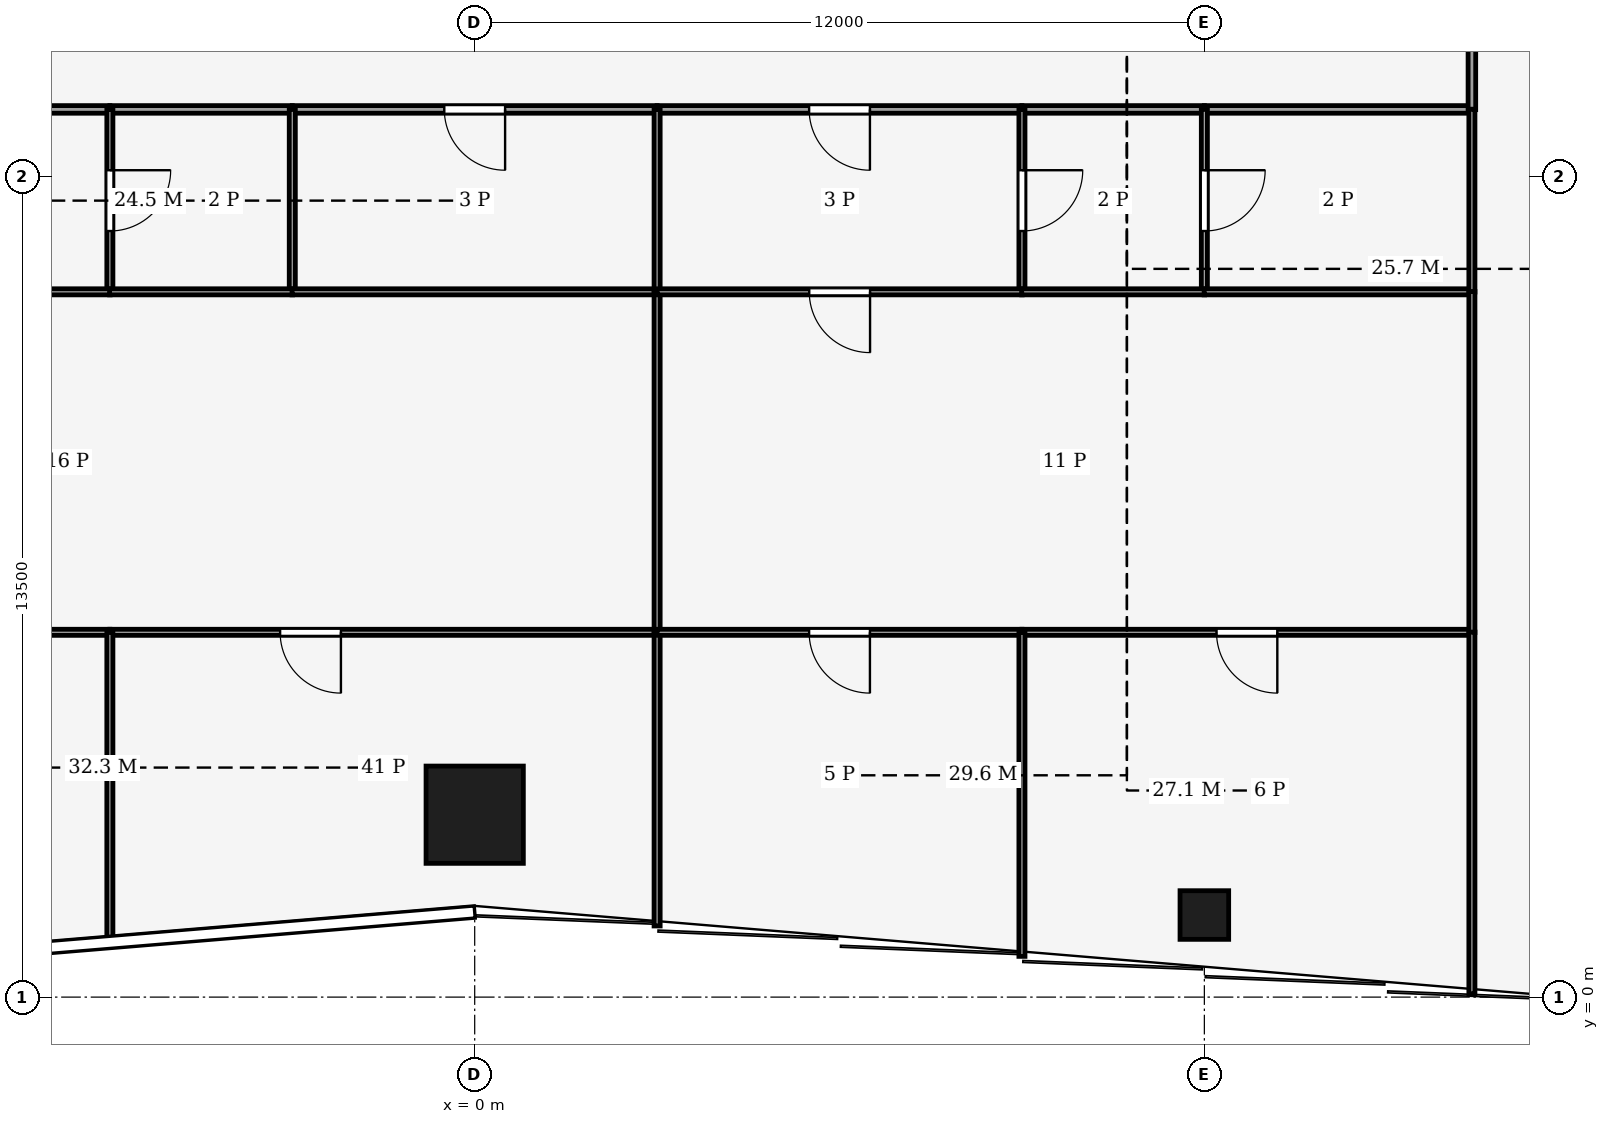
"""IFC4 building model, lengths in metres.
Left out: names, types, materials, properties, quantities, classifications, styles, units other than length and angle.
Written with IfcOpenShell. Run it as: python <this file> out.ifc"""

import sys

from ifc_helpers import new_model, si_unit, direction, frame, frame_2d, origin, origin_2d, place, context, subcontext, project, spatial, rectangle, hollow_rectangle, extrude, element, fill, save


model = new_model("IFC4")
c1 = context("Model", 3, precision=1e-05, world=origin(), true_north=direction((0.0, 1.0)))
c2 = subcontext(c1, "Body", "Model", "MODEL_VIEW")
j1 = project(units=[si_unit("LENGTHUNIT", "METRE"), si_unit("PLANEANGLEUNIT", "RADIAN")], contexts=[c1])
p1 = place(None, origin())
s1 = spatial("IfcSite", under=j1, at=p1, CompositionType="ELEMENT")
p2 = place(p1, origin())
s2 = spatial("IfcBuilding", under=s1, at=p2, CompositionType="ELEMENT")
p3 = place(p2, frame((0.0, 0.0, 34.0)))
s3 = spatial("IfcBuildingStorey", under=s2, at=p3, CompositionType="ELEMENT", Elevation=34.0)
p4 = place(p3, frame((0.0, 3.0, 0.0), z_axis=(0.0, 0.0, 1.0), x_axis=(1.0, 0.0, 0.0)))
e1 = element("IfcColumn", 1, at=p4, inside=s3, PredefinedType="COLUMN", context=c2, shape_type="SweptSolid", body=[
    extrude(hollow_rectangle(XDim=1.6, YDim=1.6, WallThickness=0.09, at=origin_2d()), origin(), (0.0, 0.0, 1.0), 4.0),
])
p5 = place(p3, frame((12.0, 1.35, 0.0), z_axis=(0.0, 0.0, 1.0), x_axis=(1.0, 0.0, 0.0)))
e2 = element("IfcColumn", 2, at=p5, inside=s3, PredefinedType="COLUMN", context=c2, shape_type="SweptSolid", body=[
    extrude(hollow_rectangle(XDim=0.8, YDim=0.8, WallThickness=0.04, at=origin_2d()), origin(), (0.0, 0.0, 1.0), 4.0),
])
for number, where, z_axis, x_axis in (
    (3, (-9.0, 14.6, 0.0), (0.0, 0.0, 1.0), (1.0, 0.0, 0.0)),
    (4, (-6.0, 14.6, 0.0), (0.0, 0.0, 1.0), (1.0, 0.0, 0.0)),
):
    element("IfcWall", number, at=place(p3, frame(where, z_axis=z_axis, x_axis=x_axis)), inside=s3, PredefinedType="PARTITIONING", context=c2, shape_type="SweptSolid", body=[
        extrude(rectangle(XDim=3.0, YDim=0.125, at=frame_2d((1.5, 0.0))), origin(), (0.0, 0.0, 1.0), 3.29),
    ])
p6 = place(p3, frame((3.0, 14.6, 0.0), z_axis=(0.0, 0.0, 1.0), x_axis=(-1.0, 0.0, 0.0)))
e5 = element("IfcWall", 5, at=p6, inside=s3, PredefinedType="PARTITIONING", context=c2, shape_type="SweptSolid", body=[
    extrude(rectangle(XDim=6.0, YDim=0.125, at=frame_2d((3.0, 0.0))), origin(), (0.0, 0.0, 1.0), 3.34),
])
p7 = place(p6, frame((2.5, 0.0, 0.0)))
e6 = element("IfcOpeningElement", 6, at=p7, cuts=e5, PredefinedType="OPENING", context=c2, shape_type="SweptSolid", body=[
    extrude(rectangle(XDim=1.0, YDim=2.1, at=frame_2d((0.5, 1.05))), frame((0.0, 0.073, 0.0), z_axis=(0.0, -1.0, 0.0), x_axis=(1.0, 0.0, 0.0)), (0.0, 0.0, 1.0), 0.145),
])
p8 = place(p3, frame((9.0, 14.6, 0.0), z_axis=(0.0, 0.0, 1.0), x_axis=(-1.0, 0.0, 0.0)))
e7 = element("IfcWall", 7, at=p8, inside=s3, PredefinedType="PARTITIONING", context=c2, shape_type="SweptSolid", body=[
    extrude(rectangle(XDim=6.0, YDim=0.125, at=frame_2d((3.0, 0.0))), origin(), (0.0, 0.0, 1.0), 3.29),
])
p9 = place(p8, frame((2.5, 0.0, 0.0)))
e8 = element("IfcOpeningElement", 8, at=p9, cuts=e7, PredefinedType="OPENING", context=c2, shape_type="SweptSolid", body=[
    extrude(rectangle(XDim=1.0, YDim=2.1, at=frame_2d((0.5, 1.05))), frame((0.0, 0.073, 0.0), z_axis=(0.0, -1.0, 0.0), x_axis=(1.0, 0.0, 0.0)), (0.0, 0.0, 1.0), 0.145),
])
p10 = place(p3, frame((9.0, 14.6, 0.0), z_axis=(0.0, 0.0, 1.0), x_axis=(1.0, 0.0, 0.0)))
e9 = element("IfcWall", 9, at=p10, inside=s3, PredefinedType="PARTITIONING", context=c2, shape_type="SweptSolid", body=[
    extrude(rectangle(XDim=3.0, YDim=0.125, at=frame_2d((1.5, 0.0))), origin(), (0.0, 0.0, 1.0), 3.29),
])
p11 = place(p3, frame((12.0, 14.6, 0.0), z_axis=(0.0, 0.0, 1.0), x_axis=(1.0, 0.0, 0.0)))
e10 = element("IfcWall", 10, at=p11, inside=s3, PredefinedType="PARTITIONING", context=c2, shape_type="SweptSolid", body=[
    extrude(rectangle(XDim=4.4, YDim=0.125, at=frame_2d((2.2, 0.0))), origin(), (0.0, 0.0, 1.0), 3.29),
])
p12 = place(p3, frame((16.4, 18.0, 0.0), z_axis=(0.0, 0.0, 1.0), x_axis=(0.0, -1.0, 0.0)))
e11 = element("IfcWall", 11, at=p12, inside=s3, PredefinedType="PARTITIONING", context=c2, shape_type="SweptSolid", body=[
    extrude(rectangle(XDim=3.404, YDim=0.125, at=frame_2d((1.702, 0.0))), origin(), (0.0, 0.0, 1.0), 3.14),
])
p13 = place(p12, frame((1.202, 0.0, 0.0)))
e12 = element("IfcOpeningElement", 12, at=p13, cuts=e11, PredefinedType="OPENING", context=c2, shape_type="SweptSolid", body=[
    extrude(rectangle(XDim=1.0, YDim=2.1, at=frame_2d((0.5, 1.05))), frame((0.0, 0.073, 0.0), z_axis=(0.0, -1.0, 0.0), x_axis=(1.0, 0.0, 0.0)), (0.0, 0.0, 1.0), 0.145),
])
p14 = place(p3, frame((-6.0, 14.6, 0.0), z_axis=(0.0, 0.0, 1.0), x_axis=(0.0, -1.0, 0.0)))
e13 = element("IfcWall", 13, at=p14, inside=s3, PredefinedType="PARTITIONING", context=c2, shape_type="SweptSolid", body=[
    extrude(rectangle(XDim=3.0, YDim=0.1, at=frame_2d((1.5, 0.0))), origin(), (0.0, 0.0, 1.0), 3.87),
])
p15 = place(p14, frame((1.0, 0.0, 0.0)))
e14 = element("IfcOpeningElement", 14, at=p15, cuts=e13, PredefinedType="OPENING", context=c2, shape_type="SweptSolid", body=[
    extrude(rectangle(XDim=1.0, YDim=2.1, at=frame_2d((0.5, 1.05))), frame((0.0, 0.06, 0.0), z_axis=(0.0, -1.0, 0.0), x_axis=(1.0, 0.0, 0.0)), (0.0, 0.0, 1.0), 0.12),
])
p16 = place(p3, frame((-9.004, 11.6, 0.0), z_axis=(0.0, 0.0, 1.0), x_axis=(1.0, 0.0, 0.0)))
e15 = element("IfcWall", 15, at=p16, inside=s3, PredefinedType="PARTITIONING", context=c2, shape_type="SweptSolid", body=[
    extrude(rectangle(XDim=3.008, YDim=0.1, at=frame_2d((1.504, 0.0))), origin(), (0.0, 0.0, 1.0), 3.29),
])
p17 = place(p3, frame((-3.0, 11.6, 0.0), z_axis=(0.0, 0.0, 1.0), x_axis=(0.0, 1.0, 0.0)))
e16 = element("IfcWall", 16, at=p17, inside=s3, PredefinedType="PARTITIONING", context=c2, shape_type="SweptSolid", body=[
    extrude(rectangle(XDim=3.0, YDim=0.1, at=frame_2d((1.5, 0.0))), origin(), (0.0, 0.0, 1.0), 3.87),
])
p18 = place(p3, frame((-6.004, 11.6, 0.0), z_axis=(0.0, 0.0, 1.0), x_axis=(1.0, 0.0, 0.0)))
e17 = element("IfcWall", 17, at=p18, inside=s3, PredefinedType="PARTITIONING", context=c2, shape_type="SweptSolid", body=[
    extrude(rectangle(XDim=3.008, YDim=0.1, at=frame_2d((1.504, 0.0))), origin(), (0.0, 0.0, 1.0), 3.29),
])
p19 = place(p3, frame((-3.004, 11.6, 0.0), z_axis=(0.0, 0.0, 1.0), x_axis=(1.0, 0.0, 0.0)))
e18 = element("IfcWall", 18, at=p19, inside=s3, PredefinedType="PARTITIONING", context=c2, shape_type="SweptSolid", body=[
    extrude(rectangle(XDim=6.004, YDim=0.1, at=frame_2d((3.002, 0.0))), origin(), (0.0, 0.0, 1.0), 3.34),
])
p20 = place(p3, frame((3.0, 11.6, 0.0), z_axis=(0.0, 0.0, 1.0), x_axis=(0.0, 1.0, 0.0)))
e19 = element("IfcWall", 19, at=p20, inside=s3, PredefinedType="PARTITIONING", context=c2, shape_type="SweptSolid", body=[
    extrude(rectangle(XDim=3.0, YDim=0.1, at=frame_2d((1.5, 0.0))), origin(), (0.0, 0.0, 1.0), 3.87),
])
p21 = place(p3, frame((-6.0, 6.0, 0.0), z_axis=(0.0, 0.0, 1.0), x_axis=(-1.0, 0.0, 0.0)))
e20 = element("IfcWall", 20, at=p21, inside=s3, PredefinedType="PARTITIONING", context=c2, shape_type="SweptSolid", body=[
    extrude(rectangle(XDim=10.4, YDim=0.1, at=frame_2d((5.2, 0.0))), origin(), (0.0, 0.0, 1.0), 3.29),
])
p22 = place(p21, frame((4.7, 0.0, 0.0)))
e21 = element("IfcOpeningElement", 21, at=p22, cuts=e20, PredefinedType="OPENING", context=c2, shape_type="SweptSolid", body=[
    extrude(rectangle(XDim=1.0, YDim=2.1, at=frame_2d((0.5, 1.05))), frame((0.0, 0.06, 0.0), z_axis=(0.0, -1.0, 0.0), x_axis=(1.0, 0.0, 0.0)), (0.0, 0.0, 1.0), 0.12),
])
p23 = place(p3, frame((3.0, 6.0, 0.0), z_axis=(0.0, 0.0, 1.0), x_axis=(-1.0, 0.0, 0.0)))
e22 = element("IfcWall", 22, at=p23, inside=s3, PredefinedType="PARTITIONING", context=c2, shape_type="SweptSolid", body=[
    extrude(rectangle(XDim=9.0, YDim=0.1, at=frame_2d((4.5, 0.0))), origin(), (0.0, 0.0, 1.0), 3.29),
])
p24 = place(p23, frame((5.2, 0.0, 0.0)))
e23 = element("IfcOpeningElement", 23, at=p24, cuts=e22, PredefinedType="OPENING", context=c2, shape_type="SweptSolid", body=[
    extrude(rectangle(XDim=1.0, YDim=2.1, at=frame_2d((0.5, 1.05))), frame((0.0, 0.06, 0.0), z_axis=(0.0, -1.0, 0.0), x_axis=(1.0, 0.0, 0.0)), (0.0, 0.0, 1.0), 0.12),
])
p25 = place(p3, frame((3.0, 6.0, 0.0), z_axis=(0.0, 0.0, 1.0), x_axis=(0.0, 1.0, 0.0)))
e24 = element("IfcWall", 24, at=p25, inside=s3, PredefinedType="PARTITIONING", context=c2, shape_type="SweptSolid", body=[
    extrude(rectangle(XDim=5.6, YDim=0.1, at=frame_2d((2.8, 0.0))), origin(), (0.0, 0.0, 1.0), 3.87),
])
p26 = place(p3, frame((-6.0, 0.92, 0.0), z_axis=(0.0, 0.0, 1.0), x_axis=(0.0, 1.0, 0.0)))
e25 = element("IfcWall", 25, at=p26, inside=s3, PredefinedType="PARTITIONING", context=c2, shape_type="SweptSolid", body=[
    extrude(rectangle(XDim=5.08, YDim=0.1, at=frame_2d((2.54, 0.0))), origin(), (0.0, 0.0, 1.0), 3.04),
])
p27 = place(p3, frame((3.0, 1.17, 0.0), z_axis=(0.0, 0.0, 1.0), x_axis=(0.0, 1.0, 0.0)))
e26 = element("IfcWall", 26, at=p27, inside=s3, PredefinedType="PARTITIONING", context=c2, shape_type="SweptSolid", body=[
    extrude(rectangle(XDim=4.83, YDim=0.1, at=frame_2d((2.415, 0.0))), origin(), (0.0, 0.0, 1.0), 3.04),
])
p28 = place(p3, frame((9.0, 14.6, 0.0), z_axis=(0.0, 0.0, 1.0), x_axis=(0.0, -1.0, 0.0)))
e27 = element("IfcWall", 27, at=p28, inside=s3, PredefinedType="PARTITIONING", context=c2, shape_type="SweptSolid", body=[
    extrude(rectangle(XDim=3.0, YDim=0.1, at=frame_2d((1.5, 0.0))), origin(), (0.0, 0.0, 1.0), 3.87),
])
p29 = place(p28, frame((1.0, 0.0, 0.0)))
e28 = element("IfcOpeningElement", 28, at=p29, cuts=e27, PredefinedType="OPENING", context=c2, shape_type="SweptSolid", body=[
    extrude(rectangle(XDim=1.0, YDim=2.1, at=frame_2d((0.5, 1.05))), frame((0.0, 0.06, 0.0), z_axis=(0.0, -1.0, 0.0), x_axis=(1.0, 0.0, 0.0)), (0.0, 0.0, 1.0), 0.12),
])
p30 = place(p3, frame((9.004, 11.6, 0.0), z_axis=(0.0, 0.0, 1.0), x_axis=(-1.0, 0.0, 0.0)))
e29 = element("IfcWall", 29, at=p30, inside=s3, PredefinedType="PARTITIONING", context=c2, shape_type="SweptSolid", body=[
    extrude(rectangle(XDim=6.004, YDim=0.1, at=frame_2d((3.002, 0.0))), origin(), (0.0, 0.0, 1.0), 3.29),
])
p31 = place(p30, frame((2.502, 0.0, 0.0)))
e30 = element("IfcOpeningElement", 30, at=p31, cuts=e29, PredefinedType="OPENING", context=c2, shape_type="SweptSolid", body=[
    extrude(rectangle(XDim=1.0, YDim=2.1, at=frame_2d((0.5, 1.05))), frame((0.0, 0.06, 0.0), z_axis=(0.0, -1.0, 0.0), x_axis=(1.0, 0.0, 0.0)), (0.0, 0.0, 1.0), 0.12),
])
p32 = place(p3, frame((12.0, 14.6, 0.0), z_axis=(0.0, 0.0, 1.0), x_axis=(0.0, -1.0, 0.0)))
e31 = element("IfcWall", 31, at=p32, inside=s3, PredefinedType="PARTITIONING", context=c2, shape_type="SweptSolid", body=[
    extrude(rectangle(XDim=3.0, YDim=0.1, at=frame_2d((1.5, 0.0))), origin(), (0.0, 0.0, 1.0), 3.29),
])
p33 = place(p32, frame((1.0, 0.0, 0.0)))
e32 = element("IfcOpeningElement", 32, at=p33, cuts=e31, PredefinedType="OPENING", context=c2, shape_type="SweptSolid", body=[
    extrude(rectangle(XDim=1.0, YDim=2.1, at=frame_2d((0.5, 1.05))), frame((0.0, 0.06, 0.0), z_axis=(0.0, -1.0, 0.0), x_axis=(1.0, 0.0, 0.0)), (0.0, 0.0, 1.0), 0.12),
])
p34 = place(p3, frame((8.996, 11.6, 0.0), z_axis=(0.0, 0.0, 1.0), x_axis=(1.0, 0.0, 0.0)))
e33 = element("IfcWall", 33, at=p34, inside=s3, PredefinedType="PARTITIONING", context=c2, shape_type="SweptSolid", body=[
    extrude(rectangle(XDim=3.008, YDim=0.1, at=frame_2d((1.504, 0.0))), origin(), (0.0, 0.0, 1.0), 3.87),
])
p35 = place(p3, frame((11.996, 11.6, 0.0), z_axis=(0.0, 0.0, 1.0), x_axis=(1.0, 0.0, 0.0)))
e34 = element("IfcWall", 34, at=p35, inside=s3, PredefinedType="PARTITIONING", context=c2, shape_type="SweptSolid", body=[
    extrude(rectangle(XDim=4.404, YDim=0.1, at=frame_2d((2.202, 0.0))), origin(), (0.0, 0.0, 1.0), 3.29),
])
p36 = place(p3, frame((16.4, 11.596, 0.0), z_axis=(0.0, 0.0, 1.0), x_axis=(0.0, 1.0, 0.0)))
e35 = element("IfcWall", 35, at=p36, inside=s3, PredefinedType="PARTITIONING", context=c2, shape_type="SweptSolid", body=[
    extrude(rectangle(XDim=3.008, YDim=0.1, at=frame_2d((1.504, 0.0))), origin(), (0.0, 0.0, 1.0), 3.87),
])
p37 = place(p3, frame((9.0, 6.0, 0.0), z_axis=(0.0, 0.0, 1.0), x_axis=(-1.0, 0.0, 0.0)))
e36 = element("IfcWall", 36, at=p37, inside=s3, PredefinedType="PARTITIONING", context=c2, shape_type="SweptSolid", body=[
    extrude(rectangle(XDim=6.0, YDim=0.1, at=frame_2d((3.0, 0.0))), origin(), (0.0, 0.0, 1.0), 3.29),
])
p38 = place(p37, frame((2.5, 0.0, 0.0)))
e37 = element("IfcOpeningElement", 37, at=p38, cuts=e36, PredefinedType="OPENING", context=c2, shape_type="SweptSolid", body=[
    extrude(rectangle(XDim=1.0, YDim=2.1, at=frame_2d((0.5, 1.05))), frame((0.0, 0.06, 0.0), z_axis=(0.0, -1.0, 0.0), x_axis=(1.0, 0.0, 0.0)), (0.0, 0.0, 1.0), 0.12),
])
p39 = place(p3, frame((16.4, 6.0, 0.0), z_axis=(0.0, 0.0, 1.0), x_axis=(-1.0, 0.0, 0.0)))
e38 = element("IfcWall", 38, at=p39, inside=s3, PredefinedType="PARTITIONING", context=c2, shape_type="SweptSolid", body=[
    extrude(rectangle(XDim=7.4, YDim=0.1, at=frame_2d((3.7, 0.0))), origin(), (0.0, 0.0, 1.0), 3.29),
])
p40 = place(p39, frame((3.2, 0.0, 0.0)))
e39 = element("IfcOpeningElement", 39, at=p40, cuts=e38, PredefinedType="OPENING", context=c2, shape_type="SweptSolid", body=[
    extrude(rectangle(XDim=1.0, YDim=2.1, at=frame_2d((0.5, 1.05))), frame((0.0, 0.06, 0.0), z_axis=(0.0, -1.0, 0.0), x_axis=(1.0, 0.0, 0.0)), (0.0, 0.0, 1.0), 0.12),
])
p41 = place(p3, frame((16.4, 5.996, 0.0), z_axis=(0.0, 0.0, 1.0), x_axis=(0.0, 1.0, 0.0)))
e40 = element("IfcWall", 40, at=p41, inside=s3, PredefinedType="PARTITIONING", context=c2, shape_type="SweptSolid", body=[
    extrude(rectangle(XDim=5.608, YDim=0.1, at=frame_2d((2.804, 0.0))), origin(), (0.0, 0.0, 1.0), 3.87),
])
p42 = place(p3, frame((9.0, 0.67, 0.0), z_axis=(0.0, 0.0, 1.0), x_axis=(0.0, 1.0, 0.0)))
e41 = element("IfcWall", 41, at=p42, inside=s3, PredefinedType="PARTITIONING", context=c2, shape_type="SweptSolid", body=[
    extrude(rectangle(XDim=5.33, YDim=0.1, at=frame_2d((2.665, 0.0))), origin(), (0.0, 0.0, 1.0), 3.04),
])
p43 = place(p3, frame((16.4, 0.053, 0.0), z_axis=(0.0, 0.0, 1.0), x_axis=(0.0, 1.0, 0.0)))
e42 = element("IfcWall", 42, at=p43, inside=s3, PredefinedType="PARTITIONING", context=c2, shape_type="SweptSolid", body=[
    extrude(rectangle(XDim=5.951, YDim=0.1, at=frame_2d((2.975, 0.0))), origin(), (0.0, 0.0, 1.0), 3.04),
])
p44 = place(p7, origin())
e43 = element("IfcDoor", 43, at=p44, inside=s3, OperationType="SINGLE_SWING_RIGHT", PredefinedType="DOOR", context=c2, shape_type="SweptSolid", body=[
    extrude(rectangle(XDim=1.0, YDim=2.1, at=frame_2d((0.5, 1.05))), frame((0.0, 0.025, 0.0), z_axis=(0.0, -1.0, 0.0), x_axis=(1.0, 0.0, 0.0)), (0.0, 0.0, 1.0), 0.05),
])
fill(e6, e43)
p45 = place(p9, origin())
e44 = element("IfcDoor", 44, at=p45, inside=s3, OperationType="SINGLE_SWING_LEFT", PredefinedType="DOOR", context=c2, shape_type="SweptSolid", body=[
    extrude(rectangle(XDim=1.0, YDim=2.1, at=frame_2d((0.5, 1.05))), frame((0.0, 0.025, 0.0), z_axis=(0.0, -1.0, 0.0), x_axis=(1.0, 0.0, 0.0)), (0.0, 0.0, 1.0), 0.05),
])
fill(e8, e44)
p46 = place(p15, origin())
e45 = element("IfcDoor", 45, at=p46, inside=s3, OperationType="SINGLE_SWING_RIGHT", PredefinedType="DOOR", context=c2, shape_type="SweptSolid", body=[
    extrude(rectangle(XDim=1.0, YDim=2.1, at=frame_2d((0.5, 1.05))), frame((0.0, 0.025, 0.0), z_axis=(0.0, -1.0, 0.0), x_axis=(1.0, 0.0, 0.0)), (0.0, 0.0, 1.0), 0.05),
])
fill(e14, e45)
p47 = place(p24, origin())
e46 = element("IfcDoor", 46, at=p47, inside=s3, OperationType="SINGLE_SWING_RIGHT", PredefinedType="DOOR", context=c2, shape_type="SweptSolid", body=[
    extrude(rectangle(XDim=1.0, YDim=2.1, at=frame_2d((0.5, 1.05))), frame((0.0, 0.025, 0.0), z_axis=(0.0, -1.0, 0.0), x_axis=(1.0, 0.0, 0.0)), (0.0, 0.0, 1.0), 0.05),
])
fill(e23, e46)
p48 = place(p29, origin())
e47 = element("IfcDoor", 47, at=p48, inside=s3, OperationType="SINGLE_SWING_LEFT", PredefinedType="DOOR", context=c2, shape_type="SweptSolid", body=[
    extrude(rectangle(XDim=1.0, YDim=2.1, at=frame_2d((0.5, 1.05))), frame((0.0, 0.025, 0.0), z_axis=(0.0, -1.0, 0.0), x_axis=(1.0, 0.0, 0.0)), (0.0, 0.0, 1.0), 0.05),
])
fill(e28, e47)
p49 = place(p31, origin())
e48 = element("IfcDoor", 48, at=p49, inside=s3, OperationType="SINGLE_SWING_RIGHT", PredefinedType="DOOR", context=c2, shape_type="SweptSolid", body=[
    extrude(rectangle(XDim=1.0, YDim=2.1, at=frame_2d((0.5, 1.05))), frame((0.0, 0.025, 0.0), z_axis=(0.0, -1.0, 0.0), x_axis=(1.0, 0.0, 0.0)), (0.0, 0.0, 1.0), 0.05),
])
fill(e30, e48)
p50 = place(p33, origin())
e49 = element("IfcDoor", 49, at=p50, inside=s3, OperationType="SINGLE_SWING_LEFT", PredefinedType="DOOR", context=c2, shape_type="SweptSolid", body=[
    extrude(rectangle(XDim=1.0, YDim=2.1, at=frame_2d((0.5, 1.05))), frame((0.0, 0.025, 0.0), z_axis=(0.0, -1.0, 0.0), x_axis=(1.0, 0.0, 0.0)), (0.0, 0.0, 1.0), 0.05),
])
fill(e32, e49)
p51 = place(p38, origin())
e50 = element("IfcDoor", 50, at=p51, inside=s3, OperationType="SINGLE_SWING_RIGHT", PredefinedType="DOOR", context=c2, shape_type="SweptSolid", body=[
    extrude(rectangle(XDim=1.0, YDim=2.1, at=frame_2d((0.5, 1.05))), frame((0.0, 0.025, 0.0), z_axis=(0.0, -1.0, 0.0), x_axis=(1.0, 0.0, 0.0)), (0.0, 0.0, 1.0), 0.05),
])
fill(e37, e50)
p52 = place(p40, origin())
e51 = element("IfcDoor", 51, at=p52, inside=s3, OperationType="SINGLE_SWING_LEFT", PredefinedType="DOOR", context=c2, shape_type="SweptSolid", body=[
    extrude(rectangle(XDim=1.0, YDim=2.1, at=frame_2d((0.5, 1.05))), frame((0.0, 0.025, 0.0), z_axis=(0.0, -1.0, 0.0), x_axis=(1.0, 0.0, 0.0)), (0.0, 0.0, 1.0), 0.05),
])
fill(e39, e51)
save(model, sys.argv[1])
